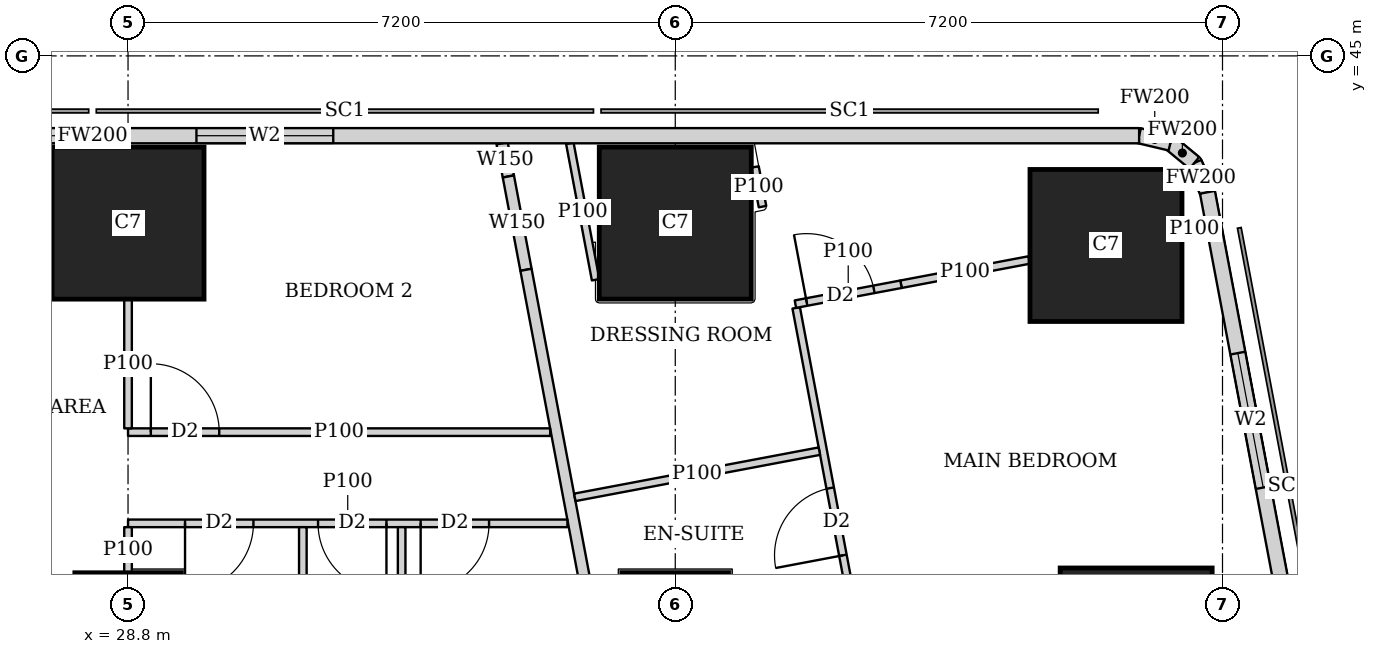
"""IFC4 building model, lengths in metres.
Left out: names, types, materials, properties, quantities, classifications, styles, units other than length and angle.
Written with IfcOpenShell. Run it as: python <this file> out.ifc"""

import sys

from ifc_helpers import new_model, si_unit, direction, frame, frame_2d, origin, origin_2d, place, context, subcontext, project, spatial, rectangle, extrude, element, fill, save


model = new_model("IFC4")
c1 = context("Model", 3, precision=1e-05, world=origin(), true_north=direction((0.0, 1.0)))
c2 = subcontext(c1, "Body", "Model", "MODEL_VIEW")
j1 = project(units=[si_unit("LENGTHUNIT", "METRE"), si_unit("PLANEANGLEUNIT", "RADIAN")], contexts=[c1])
p1 = place(None, origin())
s1 = spatial("IfcSite", under=j1, at=p1, CompositionType="ELEMENT")
p2 = place(p1, origin())
s2 = spatial("IfcBuilding", under=s1, at=p2, CompositionType="ELEMENT")
p3 = place(p2, frame((0.0, 0.0, 285.35)))
s3 = spatial("IfcBuildingStorey", under=s2, at=p3, CompositionType="ELEMENT", Elevation=285.35)
for number, where, z_axis, x_axis in (
    (1, (28.8, 37.5, 0.0), (0.0, 0.0, 1.0), (1.0, 0.0, 0.0)),
    (2, (36.0, 37.5, 0.0), (0.0, 0.0, 1.0), (1.0, 0.0, 0.0)),
):
    element("IfcColumn", number, at=place(p3, frame(where, z_axis=z_axis, x_axis=x_axis)), inside=s3, PredefinedType="COLUMN", context=c2, shape_type="SweptSolid", body=[
        extrude(rectangle(XDim=1.4, YDim=1.4, at=origin_2d()), origin(), (0.0, 0.0, 1.0), 3.75),
    ])
for number, where, z_axis, x_axis in (
    (3, (42.064, 37.263, 0.0), (0.0, 0.0, 1.0), (1.0, 0.0, 0.0)),
    (4, (28.8, 42.8, 0.0), (0.0, 0.0, 1.0), (1.0, 0.0, 0.0)),
    (5, (36.0, 42.8, 0.0), (0.0, 0.0, 1.0), (1.0, 0.0, 0.0)),
    (6, (41.667, 42.506, 0.0), (0.0, 0.0, 1.0), (1.0, 0.0, 0.0)),
):
    element("IfcColumn", number, at=place(p3, frame(where, z_axis=z_axis, x_axis=x_axis)), inside=s3, PredefinedType="COLUMN", context=c2, shape_type="SweptSolid", body=[
        extrude(rectangle(XDim=2.0, YDim=2.0, at=origin_2d()), origin(), (0.0, 0.0, 1.0), 3.75),
    ])
p4 = place(p3, frame((49.684, 7.832, 0.0), z_axis=(0.0, 0.0, 1.0), x_axis=(-0.185616669694, 0.982622232565, 0.0)))
e7 = element("IfcWall", 7, at=p4, inside=s3, PredefinedType="SOLIDWALL", context=c2, shape_type="SweptSolid", body=[
    extrude(rectangle(XDim=36.0, YDim=0.2, at=frame_2d((18.0, 0.0))), origin(), (0.0, 0.0, 1.0), 3.5),
])
p5 = place(p4, frame((2.518, 0.0, 0.9)))
e8 = element("IfcOpeningElement", 8, at=p5, cuts=e7, PredefinedType="OPENING", context=c2, shape_type="SweptSolid", body=[
    extrude(rectangle(XDim=2.4, YDim=1.5, at=frame_2d((1.2, 0.75))), frame((0.0, 0.11, 0.0), z_axis=(0.0, -1.0, 0.0), x_axis=(1.0, 0.0, 0.0)), (0.0, 0.0, 1.0), 0.22),
])
p6 = place(p4, frame((8.444, 0.0, 0.9)))
e9 = element("IfcOpeningElement", 9, at=p6, cuts=e7, PredefinedType="OPENING", context=c2, shape_type="SweptSolid", body=[
    extrude(rectangle(XDim=1.8, YDim=1.5, at=frame_2d((0.9, 0.75))), frame((0.0, 0.11, 0.0), z_axis=(0.0, -1.0, 0.0), x_axis=(1.0, 0.0, 0.0)), (0.0, 0.0, 1.0), 0.22),
])
p7 = place(p4, frame((12.261, 0.0, 0.9)))
e10 = element("IfcOpeningElement", 10, at=p7, cuts=e7, PredefinedType="OPENING", context=c2, shape_type="SweptSolid", body=[
    extrude(rectangle(XDim=1.8, YDim=1.5, at=frame_2d((0.9, 0.75))), frame((0.0, 0.11, 0.0), z_axis=(0.0, -1.0, 0.0), x_axis=(1.0, 0.0, 0.0)), (0.0, 0.0, 1.0), 0.22),
])
p8 = place(p4, frame((16.078, 0.0, 0.9)))
e11 = element("IfcOpeningElement", 11, at=p8, cuts=e7, PredefinedType="OPENING", context=c2, shape_type="SweptSolid", body=[
    extrude(rectangle(XDim=1.8, YDim=1.5, at=frame_2d((0.9, 0.75))), frame((0.0, 0.11, 0.0), z_axis=(0.0, -1.0, 0.0), x_axis=(1.0, 0.0, 0.0)), (0.0, 0.0, 1.0), 0.22),
])
p9 = place(p4, frame((19.894, 0.0, 0.9)))
e12 = element("IfcOpeningElement", 12, at=p9, cuts=e7, PredefinedType="OPENING", context=c2, shape_type="SweptSolid", body=[
    extrude(rectangle(XDim=1.8, YDim=1.5, at=frame_2d((0.9, 0.75))), frame((0.0, 0.11, 0.0), z_axis=(0.0, -1.0, 0.0), x_axis=(1.0, 0.0, 0.0)), (0.0, 0.0, 1.0), 0.22),
])
p10 = place(p4, frame((23.71, 0.0, 0.9)))
e13 = element("IfcOpeningElement", 13, at=p10, cuts=e7, PredefinedType="OPENING", context=c2, shape_type="SweptSolid", body=[
    extrude(rectangle(XDim=1.8, YDim=1.5, at=frame_2d((0.9, 0.75))), frame((0.0, 0.11, 0.0), z_axis=(0.0, -1.0, 0.0), x_axis=(1.0, 0.0, 0.0)), (0.0, 0.0, 1.0), 0.22),
])
p11 = place(p4, frame((27.526, 0.0, 0.9)))
e14 = element("IfcOpeningElement", 14, at=p11, cuts=e7, PredefinedType="OPENING", context=c2, shape_type="SweptSolid", body=[
    extrude(rectangle(XDim=1.8, YDim=1.5, at=frame_2d((0.9, 0.75))), frame((0.0, 0.11, 0.0), z_axis=(0.0, -1.0, 0.0), x_axis=(1.0, 0.0, 0.0)), (0.0, 0.0, 1.0), 0.22),
])
p12 = place(p4, frame((32.046, 0.0, 0.9)))
e15 = element("IfcOpeningElement", 15, at=p12, cuts=e7, PredefinedType="OPENING", context=c2, shape_type="SweptSolid", body=[
    extrude(rectangle(XDim=1.8, YDim=1.5, at=frame_2d((0.9, 0.75))), frame((0.0, 0.11, 0.0), z_axis=(0.0, -1.0, 0.0), x_axis=(1.0, 0.0, 0.0)), (0.0, 0.0, 1.0), 0.22),
])
p13 = place(p3, frame((43.002, 43.206, 0.0), z_axis=(0.0, 0.0, 1.0), x_axis=(-0.40678170573, 0.913525393124, 0.0)))
e16 = element("IfcWall", 16, at=p13, inside=s3, PredefinedType="SOLIDWALL", context=c2, shape_type="SweptSolid", body=[
    extrude(rectangle(XDim=0.423, YDim=0.2, at=frame_2d((0.211, 0.0))), origin(), (0.0, 0.0, 1.0), 3.5),
])
p14 = place(p3, frame((42.83, 43.592, 0.0), z_axis=(0.0, 0.0, 1.0), x_axis=(-0.771190539797, 0.636604391539, 0.0)))
e17 = element("IfcWall", 17, at=p14, inside=s3, PredefinedType="SOLIDWALL", context=c2, shape_type="SweptSolid", body=[
    extrude(rectangle(XDim=0.41, YDim=0.2, at=frame_2d((0.205, 0.0))), origin(), (0.0, 0.0, 1.0), 3.5),
])
p15 = place(p3, frame((42.514, 43.853, 0.0), z_axis=(0.0, 0.0, 1.0), x_axis=(-0.973288080424, 0.229587265555, 0.0)))
e18 = element("IfcWall", 18, at=p15, inside=s3, PredefinedType="SOLIDWALL", context=c2, shape_type="SweptSolid", body=[
    extrude(rectangle(XDim=0.422, YDim=0.2, at=frame_2d((0.211, 0.0))), origin(), (0.0, 0.0, 1.0), 3.5),
])
p16 = place(p3, frame((42.103, 43.95, 0.0), z_axis=(0.0, 0.0, 1.0), x_axis=(-1.0, 0.0, 0.0)))
e19 = element("IfcWall", 19, at=p16, inside=s3, PredefinedType="SOLIDWALL", context=c2, shape_type="SweptSolid", body=[
    extrude(rectangle(XDim=27.54, YDim=0.2, at=frame_2d((13.77, 0.0))), origin(), (0.0, 0.0, 1.0), 3.5),
])
p17 = place(p16, frame((10.603, 0.0, 0.9)))
e20 = element("IfcOpeningElement", 20, at=p17, cuts=e19, PredefinedType="OPENING", context=c2, shape_type="SweptSolid", body=[
    extrude(rectangle(XDim=1.8, YDim=1.5, at=frame_2d((0.9, 0.75))), frame((0.0, 0.11, 0.0), z_axis=(0.0, -1.0, 0.0), x_axis=(1.0, 0.0, 0.0)), (0.0, 0.0, 1.0), 0.22),
])
p18 = place(p16, frame((14.203, 0.0, 0.9)))
e21 = element("IfcOpeningElement", 21, at=p18, cuts=e19, PredefinedType="OPENING", context=c2, shape_type="SweptSolid", body=[
    extrude(rectangle(XDim=1.8, YDim=1.5, at=frame_2d((0.9, 0.75))), frame((0.0, 0.11, 0.0), z_axis=(0.0, -1.0, 0.0), x_axis=(1.0, 0.0, 0.0)), (0.0, 0.0, 1.0), 0.22),
])
p19 = place(p16, frame((17.803, 0.0, 0.9)))
e22 = element("IfcOpeningElement", 22, at=p19, cuts=e19, PredefinedType="OPENING", context=c2, shape_type="SweptSolid", body=[
    extrude(rectangle(XDim=1.8, YDim=1.5, at=frame_2d((0.9, 0.75))), frame((0.0, 0.11, 0.0), z_axis=(0.0, -1.0, 0.0), x_axis=(1.0, 0.0, 0.0)), (0.0, 0.0, 1.0), 0.22),
])
p20 = place(p16, frame((21.403, 0.0, 0.9)))
e23 = element("IfcOpeningElement", 23, at=p20, cuts=e19, PredefinedType="OPENING", context=c2, shape_type="SweptSolid", body=[
    extrude(rectangle(XDim=1.8, YDim=1.5, at=frame_2d((0.9, 0.75))), frame((0.0, 0.11, 0.0), z_axis=(0.0, -1.0, 0.0), x_axis=(1.0, 0.0, 0.0)), (0.0, 0.0, 1.0), 0.22),
])
p21 = place(p3, frame((33.722, 43.85, 0.0), z_axis=(0.0, 0.0, 1.0), x_axis=(0.184886516626, -0.982759877066, 0.0)))
e24 = element("IfcWall", 24, at=p21, inside=s3, PredefinedType="SOLIDWALL", context=c2, shape_type="SweptSolid", body=[
    extrude(rectangle(XDim=0.444, YDim=0.15, at=frame_2d((0.222, 0.0))), origin(), (0.0, 0.0, 1.0), 3.5),
])
p22 = place(p3, frame((33.804, 43.414, 0.0), z_axis=(0.0, 0.0, 1.0), x_axis=(0.185585816539, -0.982628060204, 0.0)))
e25 = element("IfcWall", 25, at=p22, inside=s3, PredefinedType="SOLIDWALL", context=c2, shape_type="SweptSolid", body=[
    extrude(rectangle(XDim=1.25, YDim=0.15, at=frame_2d((0.625, 0.0))), origin(), (0.0, 0.0, 1.0), 2.05),
])
p23 = place(p3, frame((34.036, 42.186, 0.0), z_axis=(0.0, 0.0, 1.0), x_axis=(0.185593518645, -0.9826266055, 0.0)))
e26 = element("IfcWall", 26, at=p23, inside=s3, PredefinedType="SOLIDWALL", context=c2, shape_type="SweptSolid", body=[
    extrude(rectangle(XDim=35.961, YDim=0.15, at=frame_2d((17.98, 0.0))), origin(), (0.0, 0.0, 1.0), 2.5),
])
p24 = place(p23, frame((19.345, 0.0, 0.0)))
e27 = element("IfcOpeningElement", 27, at=p24, cuts=e26, PredefinedType="OPENING", context=c2, shape_type="SweptSolid", body=[
    extrude(rectangle(XDim=1.0, YDim=2.1, at=frame_2d((0.5, 1.05))), frame((0.0, 0.085, 0.0), z_axis=(0.0, -1.0, 0.0), x_axis=(1.0, 0.0, 0.0)), (0.0, 0.0, 1.0), 0.17),
])
p25 = place(p23, frame((33.774, 0.0, 0.0)))
e28 = element("IfcOpeningElement", 28, at=p25, cuts=e26, PredefinedType="OPENING", context=c2, shape_type="SweptSolid", body=[
    extrude(rectangle(XDim=1.0, YDim=2.1, at=frame_2d((0.5, 1.05))), frame((0.0, 0.085, 0.0), z_axis=(0.0, -1.0, 0.0), x_axis=(1.0, 0.0, 0.0)), (0.0, 0.0, 1.0), 0.17),
])
p26 = place(p3, frame((34.952, 42.055, 0.0), z_axis=(0.0, 0.0, 1.0), x_axis=(-0.185490642006, 0.98264603074, 0.0)))
e29 = element("IfcWall", 29, at=p26, inside=s3, PredefinedType="PARTITIONING", context=c2, shape_type="SweptSolid", body=[
    extrude(rectangle(XDim=1.827, YDim=0.1, at=frame_2d((0.914, 0.0))), origin(), (0.0, 0.0, 1.0), 2.05),
])
p27 = place(p3, frame((37.049, 43.539, 0.0), z_axis=(0.0, 0.0, 1.0), x_axis=(0.186119495745, -0.982527115811, 0.0)))
e30 = element("IfcWall", 30, at=p27, inside=s3, PredefinedType="PARTITIONING", context=c2, shape_type="SweptSolid", body=[
    extrude(rectangle(XDim=0.531, YDim=0.1, at=frame_2d((0.266, 0.0))), origin(), (0.0, 0.0, 1.0), 2.05),
])
p28 = place(p3, frame((42.985, 42.755, 0.0), z_axis=(0.0, 0.0, 1.0), x_axis=(-0.98281924824, -0.184570651215, 0.0)))
e31 = element("IfcWall", 31, at=p28, inside=s3, PredefinedType="PARTITIONING", context=c2, shape_type="SweptSolid", body=[
    extrude(rectangle(XDim=0.313, YDim=0.1, at=frame_2d((0.157, 0.0))), origin(), (0.0, 0.0, 1.0), 3.5),
])
p29 = place(p3, frame((40.657, 42.315, 0.0), z_axis=(0.0, 0.0, 1.0), x_axis=(-0.982603924403, -0.185713563715, 0.0)))
e32 = element("IfcWall", 32, at=p29, inside=s3, PredefinedType="PARTITIONING", context=c2, shape_type="SweptSolid", body=[
    extrude(rectangle(XDim=1.717, YDim=0.1, at=frame_2d((0.858, 0.0))), origin(), (0.0, 0.0, 1.0), 2.05),
])
p30 = place(p3, frame((38.97, 41.996, 0.0), z_axis=(0.0, 0.0, 1.0), x_axis=(-0.982642648049, -0.185508561084, 0.0)))
e33 = element("IfcWall", 33, at=p30, inside=s3, PredefinedType="PARTITIONING", context=c2, shape_type="SweptSolid", body=[
    extrude(rectangle(XDim=1.413, YDim=0.1, at=frame_2d((0.707, 0.0))), origin(), (0.0, 0.0, 1.0), 3.5),
])
p31 = place(p30, frame((0.363, 0.0, 0.0)))
e34 = element("IfcOpeningElement", 34, at=p31, cuts=e33, PredefinedType="OPENING", context=c2, shape_type="SweptSolid", body=[
    extrude(rectangle(XDim=0.9, YDim=2.1, at=frame_2d((0.45, 1.05))), frame((0.0, 0.06, 0.0), z_axis=(0.0, -1.0, 0.0), x_axis=(1.0, 0.0, 0.0)), (0.0, 0.0, 1.0), 0.12),
])
p32 = place(p3, frame((37.896, 39.8, 0.0), z_axis=(0.0, 0.0, 1.0), x_axis=(-0.982607026909, -0.185697147715, 0.0)))
e35 = element("IfcWall", 35, at=p32, inside=s3, PredefinedType="PARTITIONING", context=c2, shape_type="SweptSolid", body=[
    extrude(rectangle(XDim=3.275, YDim=0.1, at=frame_2d((1.637, 0.0))), origin(), (0.0, 0.0, 1.0), 3.5),
])
p33 = place(p3, frame((37.591, 41.685, 0.0), z_axis=(0.0, 0.0, 1.0), x_axis=(0.185541820726, -0.982636368532, 0.0)))
e36 = element("IfcWall", 36, at=p33, inside=s3, PredefinedType="PARTITIONING", context=c2, shape_type="SweptSolid", body=[
    extrude(rectangle(XDim=16.735, YDim=0.1, at=frame_2d((8.367, 0.0))), origin(), (0.0, 0.0, 1.0), 2.5),
])
p34 = place(p33, frame((2.413, 0.0, 0.0)))
e37 = element("IfcOpeningElement", 37, at=p34, cuts=e36, PredefinedType="OPENING", context=c2, shape_type="SweptSolid", body=[
    extrude(rectangle(XDim=0.9, YDim=2.1, at=frame_2d((0.45, 1.05))), frame((0.0, 0.06, 0.0), z_axis=(0.0, -1.0, 0.0), x_axis=(1.0, 0.0, 0.0)), (0.0, 0.0, 1.0), 0.12),
])
p35 = place(p33, frame((6.713, 0.0, 0.0)))
e38 = element("IfcOpeningElement", 38, at=p35, cuts=e36, PredefinedType="OPENING", context=c2, shape_type="SweptSolid", body=[
    extrude(rectangle(XDim=0.9, YDim=2.1, at=frame_2d((0.45, 1.05))), frame((0.0, 0.06, 0.0), z_axis=(0.0, -1.0, 0.0), x_axis=(1.0, 0.0, 0.0)), (0.0, 0.0, 1.0), 0.12),
])
p36 = place(p33, frame((9.805, 0.0, 0.0)))
e39 = element("IfcOpeningElement", 39, at=p36, cuts=e36, PredefinedType="OPENING", context=c2, shape_type="SweptSolid", body=[
    extrude(rectangle(XDim=0.9, YDim=2.1, at=frame_2d((0.45, 1.05))), frame((0.0, 0.06, 0.0), z_axis=(0.0, -1.0, 0.0), x_axis=(1.0, 0.0, 0.0)), (0.0, 0.0, 1.0), 0.12),
])
p37 = place(p33, frame((11.713, 0.0, 0.0)))
e40 = element("IfcOpeningElement", 40, at=p37, cuts=e36, PredefinedType="OPENING", context=c2, shape_type="SweptSolid", body=[
    extrude(rectangle(XDim=0.9, YDim=2.1, at=frame_2d((0.45, 1.05))), frame((0.0, 0.06, 0.0), z_axis=(0.0, -1.0, 0.0), x_axis=(1.0, 0.0, 0.0)), (0.0, 0.0, 1.0), 0.12),
])
p38 = place(p33, frame((14.426, 0.0, 0.0)))
e41 = element("IfcOpeningElement", 41, at=p38, cuts=e36, PredefinedType="OPENING", context=c2, shape_type="SweptSolid", body=[
    extrude(rectangle(XDim=0.9, YDim=2.1, at=frame_2d((0.45, 1.05))), frame((0.0, 0.06, 0.0), z_axis=(0.0, -1.0, 0.0), x_axis=(1.0, 0.0, 0.0)), (0.0, 0.0, 1.0), 0.12),
])
p39 = place(p3, frame((28.8, 40.1, 0.0), z_axis=(0.0, 0.0, 1.0), x_axis=(0.0, 1.0, 0.0)))
e42 = element("IfcWall", 42, at=p39, inside=s3, PredefinedType="PARTITIONING", context=c2, shape_type="SweptSolid", body=[
    extrude(rectangle(XDim=1.699, YDim=0.1, at=frame_2d((0.85, 0.0))), origin(), (0.0, 0.0, 1.0), 3.5),
])
p40 = place(p3, frame((28.8, 38.201, 0.0), z_axis=(0.0, 0.0, 1.0), x_axis=(0.0, 1.0, 0.0)))
e43 = element("IfcWall", 43, at=p40, inside=s3, PredefinedType="PARTITIONING", context=c2, shape_type="SweptSolid", body=[
    extrude(rectangle(XDim=0.599, YDim=0.1, at=frame_2d((0.3, 0.0))), origin(), (0.0, 0.0, 1.0), 3.5),
])
for number, where, z_axis, x_axis in (
    (44, (32.4, 36.825, 0.0), (0.0, 0.0, 1.0), (0.0, 1.0, 0.0)),
    (45, (31.1, 36.825, 0.0), (0.0, 0.0, 1.0), (0.0, 1.0, 0.0)),
):
    element("IfcWall", number, at=place(p3, frame(where, z_axis=z_axis, x_axis=x_axis)), inside=s3, PredefinedType="PARTITIONING", context=c2, shape_type="SweptSolid", body=[
        extrude(rectangle(XDim=1.975, YDim=0.1, at=frame_2d((0.988, 0.0))), origin(), (0.0, 0.0, 1.0), 3.5),
    ])
p41 = place(p3, frame((28.8, 38.85, 0.0), z_axis=(0.0, 0.0, 1.0), x_axis=(1.0, 0.0, 0.0)))
e46 = element("IfcWall", 46, at=p41, inside=s3, PredefinedType="PARTITIONING", context=c2, shape_type="SweptSolid", body=[
    extrude(rectangle(XDim=5.781, YDim=0.1, at=frame_2d((2.891, 0.0))), origin(), (0.0, 0.0, 1.0), 3.5),
])
p42 = place(p41, frame((0.75, 0.0, 0.0)))
e47 = element("IfcOpeningElement", 47, at=p42, cuts=e46, PredefinedType="OPENING", context=c2, shape_type="SweptSolid", body=[
    extrude(rectangle(XDim=0.9, YDim=2.1, at=frame_2d((0.45, 1.05))), frame((0.0, 0.06, 0.0), z_axis=(0.0, -1.0, 0.0), x_axis=(1.0, 0.0, 0.0)), (0.0, 0.0, 1.0), 0.12),
])
p43 = place(p41, frame((2.5, 0.0, 0.0)))
e48 = element("IfcOpeningElement", 48, at=p43, cuts=e46, PredefinedType="OPENING", context=c2, shape_type="SweptSolid", body=[
    extrude(rectangle(XDim=0.9, YDim=2.1, at=frame_2d((0.45, 1.05))), frame((0.0, 0.06, 0.0), z_axis=(0.0, -1.0, 0.0), x_axis=(1.0, 0.0, 0.0)), (0.0, 0.0, 1.0), 0.12),
])
p44 = place(p41, frame((3.85, 0.0, 0.0)))
e49 = element("IfcOpeningElement", 49, at=p44, cuts=e46, PredefinedType="OPENING", context=c2, shape_type="SweptSolid", body=[
    extrude(rectangle(XDim=0.9, YDim=2.1, at=frame_2d((0.45, 1.05))), frame((0.0, 0.06, 0.0), z_axis=(0.0, -1.0, 0.0), x_axis=(1.0, 0.0, 0.0)), (0.0, 0.0, 1.0), 0.12),
])
p45 = place(p3, frame((28.8, 40.05, 0.0), z_axis=(0.0, 0.0, 1.0), x_axis=(1.0, 0.0, 0.0)))
e50 = element("IfcWall", 50, at=p45, inside=s3, PredefinedType="PARTITIONING", context=c2, shape_type="SweptSolid", body=[
    extrude(rectangle(XDim=5.554, YDim=0.1, at=frame_2d((2.777, 0.0))), origin(), (0.0, 0.0, 1.0), 3.5),
])
p46 = place(p45, frame((0.3, 0.0, 0.0)))
e51 = element("IfcOpeningElement", 51, at=p46, cuts=e50, PredefinedType="OPENING", context=c2, shape_type="SweptSolid", body=[
    extrude(rectangle(XDim=0.9, YDim=2.1, at=frame_2d((0.45, 1.05))), frame((0.0, 0.06, 0.0), z_axis=(0.0, -1.0, 0.0), x_axis=(1.0, 0.0, 0.0)), (0.0, 0.0, 1.0), 0.12),
])
p47 = place(p12, origin())
e52 = element("IfcWindow", 52, at=p47, inside=s3, PartitioningType="SINGLE_PANEL", PredefinedType="WINDOW", context=c2, shape_type="SweptSolid", body=[
    extrude(rectangle(XDim=1.8, YDim=1.5, at=frame_2d((0.9, 0.75))), frame((0.0, 0.03, 0.0), z_axis=(0.0, -1.0, 0.0), x_axis=(1.0, 0.0, 0.0)), (0.0, 0.0, 1.0), 0.06),
])
fill(e15, e52)
p48 = place(p17, origin())
e53 = element("IfcWindow", 53, at=p48, inside=s3, PartitioningType="SINGLE_PANEL", PredefinedType="WINDOW", context=c2, shape_type="SweptSolid", body=[
    extrude(rectangle(XDim=1.8, YDim=1.5, at=frame_2d((0.9, 0.75))), frame((0.0, 0.03, 0.0), z_axis=(0.0, -1.0, 0.0), x_axis=(1.0, 0.0, 0.0)), (0.0, 0.0, 1.0), 0.06),
])
fill(e20, e53)
p49 = place(p18, origin())
e54 = element("IfcWindow", 54, at=p49, inside=s3, PartitioningType="SINGLE_PANEL", PredefinedType="WINDOW", context=c2, shape_type="SweptSolid", body=[
    extrude(rectangle(XDim=1.8, YDim=1.5, at=frame_2d((0.9, 0.75))), frame((0.0, 0.03, 0.0), z_axis=(0.0, -1.0, 0.0), x_axis=(1.0, 0.0, 0.0)), (0.0, 0.0, 1.0), 0.06),
])
fill(e21, e54)
p50 = place(p31, origin())
e55 = element("IfcDoor", 55, at=p50, inside=s3, OperationType="SINGLE_SWING_LEFT", PredefinedType="DOOR", context=c2, shape_type="SweptSolid", body=[
    extrude(rectangle(XDim=0.9, YDim=2.1, at=frame_2d((0.45, 1.05))), frame((0.0, 0.025, 0.0), z_axis=(0.0, -1.0, 0.0), x_axis=(1.0, 0.0, 0.0)), (0.0, 0.0, 1.0), 0.05),
])
fill(e34, e55)
p51 = place(p34, origin())
e56 = element("IfcDoor", 56, at=p51, inside=s3, OperationType="SINGLE_SWING_LEFT", PredefinedType="DOOR", context=c2, shape_type="SweptSolid", body=[
    extrude(rectangle(XDim=0.9, YDim=2.1, at=frame_2d((0.45, 1.05))), frame((0.0, 0.025, 0.0), z_axis=(0.0, -1.0, 0.0), x_axis=(1.0, 0.0, 0.0)), (0.0, 0.0, 1.0), 0.05),
])
fill(e37, e56)
p52 = place(p46, origin())
e57 = element("IfcDoor", 57, at=p52, inside=s3, OperationType="SINGLE_SWING_LEFT", PredefinedType="DOOR", context=c2, shape_type="SweptSolid", body=[
    extrude(rectangle(XDim=0.9, YDim=2.1, at=frame_2d((0.45, 1.05))), frame((0.0, 0.025, 0.0), z_axis=(0.0, -1.0, 0.0), x_axis=(1.0, 0.0, 0.0)), (0.0, 0.0, 1.0), 0.05),
])
fill(e51, e57)
p53 = place(p42, origin())
e58 = element("IfcDoor", 58, at=p53, inside=s3, OperationType="SINGLE_SWING_RIGHT", PredefinedType="DOOR", context=c2, shape_type="SweptSolid", body=[
    extrude(rectangle(XDim=0.9, YDim=2.1, at=frame_2d((0.45, 1.05))), frame((0.0, 0.025, 0.0), z_axis=(0.0, -1.0, 0.0), x_axis=(1.0, 0.0, 0.0)), (0.0, 0.0, 1.0), 0.05),
])
fill(e47, e58)
p54 = place(p43, origin())
e59 = element("IfcDoor", 59, at=p54, inside=s3, OperationType="SINGLE_SWING_LEFT", PredefinedType="DOOR", context=c2, shape_type="SweptSolid", body=[
    extrude(rectangle(XDim=0.9, YDim=2.1, at=frame_2d((0.45, 1.05))), frame((0.0, 0.025, 0.0), z_axis=(0.0, -1.0, 0.0), x_axis=(1.0, 0.0, 0.0)), (0.0, 0.0, 1.0), 0.05),
])
fill(e48, e59)
p55 = place(p44, origin())
e60 = element("IfcDoor", 60, at=p55, inside=s3, OperationType="SINGLE_SWING_RIGHT", PredefinedType="DOOR", context=c2, shape_type="SweptSolid", body=[
    extrude(rectangle(XDim=0.9, YDim=2.1, at=frame_2d((0.45, 1.05))), frame((0.0, 0.025, 0.0), z_axis=(0.0, -1.0, 0.0), x_axis=(1.0, 0.0, 0.0)), (0.0, 0.0, 1.0), 0.05),
])
fill(e49, e60)
save(model, sys.argv[1])
